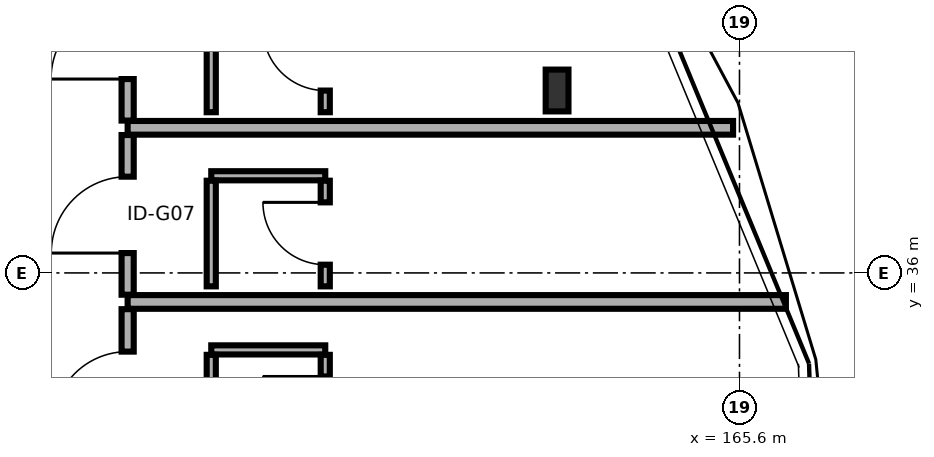
"""IFC4 building model, lengths in metres.
Left out: names, types, materials, properties, quantities, classifications, styles, units other than length and angle.
Written with IfcOpenShell. Run it as: python <this file> out.ifc"""

import sys

from ifc_helpers import new_model, si_unit, direction, frame, frame_2d, origin, origin_2d, place, context, subcontext, project, spatial, rectangle, i_section, extrude, element, fill, save


model = new_model("IFC4")
c1 = context("Model", 3, precision=1e-05, world=origin(), true_north=direction((0.0, 1.0)))
c2 = subcontext(c1, "Body", "Model", "MODEL_VIEW")
j1 = project(units=[si_unit("LENGTHUNIT", "METRE"), si_unit("PLANEANGLEUNIT", "RADIAN")], contexts=[c1])
p1 = place(None, origin())
s1 = spatial("IfcSite", under=j1, at=p1, CompositionType="ELEMENT")
p2 = place(p1, origin())
s2 = spatial("IfcBuilding", under=s1, at=p2, CompositionType="ELEMENT")
p3 = place(p2, frame((0.0, 0.0, 21.5)))
s3 = spatial("IfcBuildingStorey", under=s2, at=p3, CompositionType="ELEMENT", Elevation=21.5)
p4 = place(p3, frame((163.2, 38.4, 0.0), z_axis=(0.0, 0.0, 1.0), x_axis=(1.0, 0.0, 0.0)))
e1 = element("IfcColumn", 1, at=p4, inside=s3, PredefinedType="COLUMN", context=c2, shape_type="SweptSolid", body=[
    extrude(i_section(OverallWidth=0.3, OverallDepth=0.55, WebThickness=0.015, FlangeThickness=0.029, FilletRadius=0.027, at=origin_2d()), origin(), (0.0, 0.0, 1.0), 3.4),
])
p5 = place(p3, frame((157.55, 33.422, 0.0), z_axis=(0.0, 0.0, 1.0), x_axis=(0.0, 1.0, 0.0)))
e2 = element("IfcWall", 2, at=p5, inside=s3, PredefinedType="PARTITIONING", context=c2, shape_type="SweptSolid", body=[
    extrude(rectangle(XDim=2.101, YDim=0.16, at=frame_2d((1.05, 0.0))), origin(), (0.0, 0.0, 1.0), 3.195),
])
p6 = place(p5, frame((0.559, 0.0, 0.0)))
e3 = element("IfcOpeningElement", 3, at=p6, cuts=e2, PredefinedType="OPENING", context=c2, shape_type="SweptSolid", body=[
    extrude(rectangle(XDim=0.984, YDim=2.07, at=frame_2d((0.492, 1.035))), frame((0.0, 0.09, 0.0), z_axis=(0.0, -1.0, 0.0), x_axis=(1.0, 0.0, 0.0)), (0.0, 0.0, 1.0), 0.18),
])
p7 = place(p3, frame((158.65, 34.987, 0.0), z_axis=(0.0, 0.0, 1.0), x_axis=(1.0, 0.0, 0.0)))
e4 = element("IfcWall", 4, at=p7, inside=s3, PredefinedType="PARTITIONING", context=c2, shape_type="SweptSolid", body=[
    extrude(rectangle(XDim=1.5, YDim=0.12, at=frame_2d((0.75, 0.0))), origin(), (0.0, 0.0, 1.0), 3.195),
])
p8 = place(p3, frame((158.65, 33.532, 0.0), z_axis=(0.0, 0.0, 1.0), x_axis=(0.0, 1.0, 0.0)))
e5 = element("IfcWall", 5, at=p8, inside=s3, PredefinedType="PARTITIONING", context=c2, shape_type="SweptSolid", body=[
    extrude(rectangle(XDim=1.39, YDim=0.12, at=frame_2d((0.695, 0.0))), origin(), (0.0, 0.0, 1.0), 3.195),
])
p9 = place(p3, frame((160.15, 33.532, 0.0), z_axis=(0.0, 0.0, 1.0), x_axis=(0.0, 1.0, 0.0)))
e6 = element("IfcWall", 6, at=p9, inside=s3, PredefinedType="PARTITIONING", context=c2, shape_type="SweptSolid", body=[
    extrude(rectangle(XDim=1.39, YDim=0.12, at=frame_2d((0.695, 0.0))), origin(), (0.0, 0.0, 1.0), 3.195),
])
p10 = place(p9, frame((0.285, 0.0, 0.0)))
e7 = element("IfcOpeningElement", 7, at=p10, cuts=e6, PredefinedType="OPENING", context=c2, shape_type="SweptSolid", body=[
    extrude(rectangle(XDim=0.82, YDim=2.08, at=frame_2d((0.41, 1.04))), frame((0.0, 0.07, 0.0), z_axis=(0.0, -1.0, 0.0), x_axis=(1.0, 0.0, 0.0)), (0.0, 0.0, 1.0), 0.14),
])
p11 = place(p3, frame((157.55, 35.618, 0.0), z_axis=(0.0, 0.0, 1.0), x_axis=(1.0, 0.0, 0.0)))
e8 = element("IfcWall", 8, at=p11, inside=s3, PredefinedType="PARTITIONING", context=c2, shape_type="SweptSolid", body=[
    extrude(rectangle(XDim=8.661, YDim=0.18, at=frame_2d((4.33, 0.0))), origin(), (0.0, 0.0, 1.0), 2.68),
])
p12 = place(p3, frame((157.55, 35.713, 0.0), z_axis=(0.0, 0.0, 1.0), x_axis=(0.0, 1.0, 0.0)))
e9 = element("IfcWall", 9, at=p12, inside=s3, PredefinedType="PARTITIONING", context=c2, shape_type="SweptSolid", body=[
    extrude(rectangle(XDim=2.101, YDim=0.16, at=frame_2d((1.051, 0.0))), origin(), (0.0, 0.0, 1.0), 3.195),
])
p13 = place(p12, frame((0.548, 0.0, 0.0)))
e10 = element("IfcOpeningElement", 10, at=p13, cuts=e9, PredefinedType="OPENING", context=c2, shape_type="SweptSolid", body=[
    extrude(rectangle(XDim=1.005, YDim=2.05, at=frame_2d((0.502, 1.025))), frame((0.0, 0.09, 0.0), z_axis=(0.0, -1.0, 0.0), x_axis=(1.0, 0.0, 0.0)), (0.0, 0.0, 1.0), 0.18),
])
p14 = place(p3, frame((158.65, 37.278, 0.0), z_axis=(0.0, 0.0, 1.0), x_axis=(1.0, 0.0, 0.0)))
e11 = element("IfcWall", 11, at=p14, inside=s3, PredefinedType="PARTITIONING", context=c2, shape_type="SweptSolid", body=[
    extrude(rectangle(XDim=1.5, YDim=0.12, at=frame_2d((0.75, 0.0))), origin(), (0.0, 0.0, 1.0), 3.195),
])
p15 = place(p3, frame((158.65, 35.823, 0.0), z_axis=(0.0, 0.0, 1.0), x_axis=(0.0, 1.0, 0.0)))
e12 = element("IfcWall", 12, at=p15, inside=s3, PredefinedType="PARTITIONING", context=c2, shape_type="SweptSolid", body=[
    extrude(rectangle(XDim=1.39, YDim=0.12, at=frame_2d((0.695, 0.0))), origin(), (0.0, 0.0, 1.0), 3.195),
])
p16 = place(p3, frame((160.15, 35.823, 0.0), z_axis=(0.0, 0.0, 1.0), x_axis=(0.0, 1.0, 0.0)))
e13 = element("IfcWall", 13, at=p16, inside=s3, PredefinedType="PARTITIONING", context=c2, shape_type="SweptSolid", body=[
    extrude(rectangle(XDim=1.39, YDim=0.12, at=frame_2d((0.695, 0.0))), origin(), (0.0, 0.0, 1.0), 3.195),
])
p17 = place(p16, frame((0.285, 0.0, 0.0)))
e14 = element("IfcOpeningElement", 14, at=p17, cuts=e13, PredefinedType="OPENING", context=c2, shape_type="SweptSolid", body=[
    extrude(rectangle(XDim=0.82, YDim=2.08, at=frame_2d((0.41, 1.04))), frame((0.0, 0.07, 0.0), z_axis=(0.0, -1.0, 0.0), x_axis=(1.0, 0.0, 0.0)), (0.0, 0.0, 1.0), 0.14),
])
p18 = place(p3, frame((157.55, 37.909, 0.0), z_axis=(0.0, 0.0, 1.0), x_axis=(1.0, 0.0, 0.0)))
e15 = element("IfcWall", 15, at=p18, inside=s3, PredefinedType="PARTITIONING", context=c2, shape_type="SweptSolid", body=[
    extrude(rectangle(XDim=7.966, YDim=0.18, at=frame_2d((3.983, 0.0))), origin(), (0.0, 0.0, 1.0), 2.68),
])
p19 = place(p3, frame((157.55, 38.004, 0.0), z_axis=(0.0, 0.0, 1.0), x_axis=(0.0, 1.0, 0.0)))
e16 = element("IfcWall", 16, at=p19, inside=s3, PredefinedType="PARTITIONING", context=c2, shape_type="SweptSolid", body=[
    extrude(rectangle(XDim=2.101, YDim=0.16, at=frame_2d((1.05, 0.0))), origin(), (0.0, 0.0, 1.0), 2.73),
])
p20 = place(p19, frame((0.546, 0.0, 0.0)))
e17 = element("IfcOpeningElement", 17, at=p20, cuts=e16, PredefinedType="OPENING", context=c2, shape_type="SweptSolid", body=[
    extrude(rectangle(XDim=1.008, YDim=2.13, at=frame_2d((0.504, 1.065))), frame((0.0, 0.09, 0.0), z_axis=(0.0, -1.0, 0.0), x_axis=(1.0, 0.0, 0.0)), (0.0, 0.0, 1.0), 0.18),
])
p21 = place(p3, frame((158.65, 38.114, 0.0), z_axis=(0.0, 0.0, 1.0), x_axis=(0.0, 1.0, 0.0)))
e18 = element("IfcWall", 18, at=p21, inside=s3, PredefinedType="PARTITIONING", context=c2, shape_type="SweptSolid", body=[
    extrude(rectangle(XDim=1.39, YDim=0.12, at=frame_2d((0.695, 0.0))), origin(), (0.0, 0.0, 1.0), 2.73),
])
p22 = place(p3, frame((160.15, 38.114, 0.0), z_axis=(0.0, 0.0, 1.0), x_axis=(0.0, 1.0, 0.0)))
e19 = element("IfcWall", 19, at=p22, inside=s3, PredefinedType="PARTITIONING", context=c2, shape_type="SweptSolid", body=[
    extrude(rectangle(XDim=1.39, YDim=0.12, at=frame_2d((0.695, 0.0))), origin(), (0.0, 0.0, 1.0), 2.73),
])
p23 = place(p22, frame((0.285, 0.0, 0.0)))
e20 = element("IfcOpeningElement", 20, at=p23, cuts=e19, PredefinedType="OPENING", context=c2, shape_type="SweptSolid", body=[
    extrude(rectangle(XDim=0.82, YDim=2.08, at=frame_2d((0.41, 1.04))), frame((0.0, 0.07, 0.0), z_axis=(0.0, -1.0, 0.0), x_axis=(1.0, 0.0, 0.0)), (0.0, 0.0, 1.0), 0.14),
])
p24 = place(p6, origin())
e21 = element("IfcDoor", 21, at=p24, inside=s3, OperationType="SINGLE_SWING_LEFT", PredefinedType="DOOR", context=c2, shape_type="SweptSolid", body=[
    extrude(rectangle(XDim=0.984, YDim=2.07, at=frame_2d((0.492, 1.035))), frame((0.0, 0.025, 0.0), z_axis=(0.0, -1.0, 0.0), x_axis=(1.0, 0.0, 0.0)), (0.0, 0.0, 1.0), 0.05),
])
fill(e3, e21)
p25 = place(p10, origin())
e22 = element("IfcDoor", 22, at=p25, inside=s3, OperationType="SINGLE_SWING_RIGHT", PredefinedType="DOOR", context=c2, shape_type="SweptSolid", body=[
    extrude(rectangle(XDim=0.82, YDim=2.08, at=frame_2d((0.41, 1.04))), frame((0.0, 0.025, 0.0), z_axis=(0.0, -1.0, 0.0), x_axis=(1.0, 0.0, 0.0)), (0.0, 0.0, 1.0), 0.05),
])
fill(e7, e22)
p26 = place(p13, origin())
e23 = element("IfcDoor", 23, at=p26, inside=s3, OperationType="SINGLE_SWING_LEFT", PredefinedType="DOOR", context=c2, shape_type="SweptSolid", body=[
    extrude(rectangle(XDim=1.005, YDim=2.05, at=frame_2d((0.502, 1.025))), frame((0.0, 0.025, 0.0), z_axis=(0.0, -1.0, 0.0), x_axis=(1.0, 0.0, 0.0)), (0.0, 0.0, 1.0), 0.05),
])
fill(e10, e23)
p27 = place(p17, origin())
e24 = element("IfcDoor", 24, at=p27, inside=s3, OperationType="SINGLE_SWING_RIGHT", PredefinedType="DOOR", context=c2, shape_type="SweptSolid", body=[
    extrude(rectangle(XDim=0.82, YDim=2.08, at=frame_2d((0.41, 1.04))), frame((0.0, 0.025, 0.0), z_axis=(0.0, -1.0, 0.0), x_axis=(1.0, 0.0, 0.0)), (0.0, 0.0, 1.0), 0.05),
])
fill(e14, e24)
p28 = place(p20, origin())
e25 = element("IfcDoor", 25, at=p28, inside=s3, OperationType="SINGLE_SWING_LEFT", PredefinedType="DOOR", context=c2, shape_type="SweptSolid", body=[
    extrude(rectangle(XDim=1.008, YDim=2.13, at=frame_2d((0.504, 1.065))), frame((0.0, 0.025, 0.0), z_axis=(0.0, -1.0, 0.0), x_axis=(1.0, 0.0, 0.0)), (0.0, 0.0, 1.0), 0.05),
])
fill(e17, e25)
p29 = place(p23, origin())
e26 = element("IfcDoor", 26, at=p29, inside=s3, OperationType="SINGLE_SWING_RIGHT", PredefinedType="DOOR", context=c2, shape_type="SweptSolid", body=[
    extrude(rectangle(XDim=0.82, YDim=2.08, at=frame_2d((0.41, 1.04))), frame((0.0, 0.025, 0.0), z_axis=(0.0, -1.0, 0.0), x_axis=(1.0, 0.0, 0.0)), (0.0, 0.0, 1.0), 0.05),
])
fill(e20, e26)
save(model, sys.argv[1])
